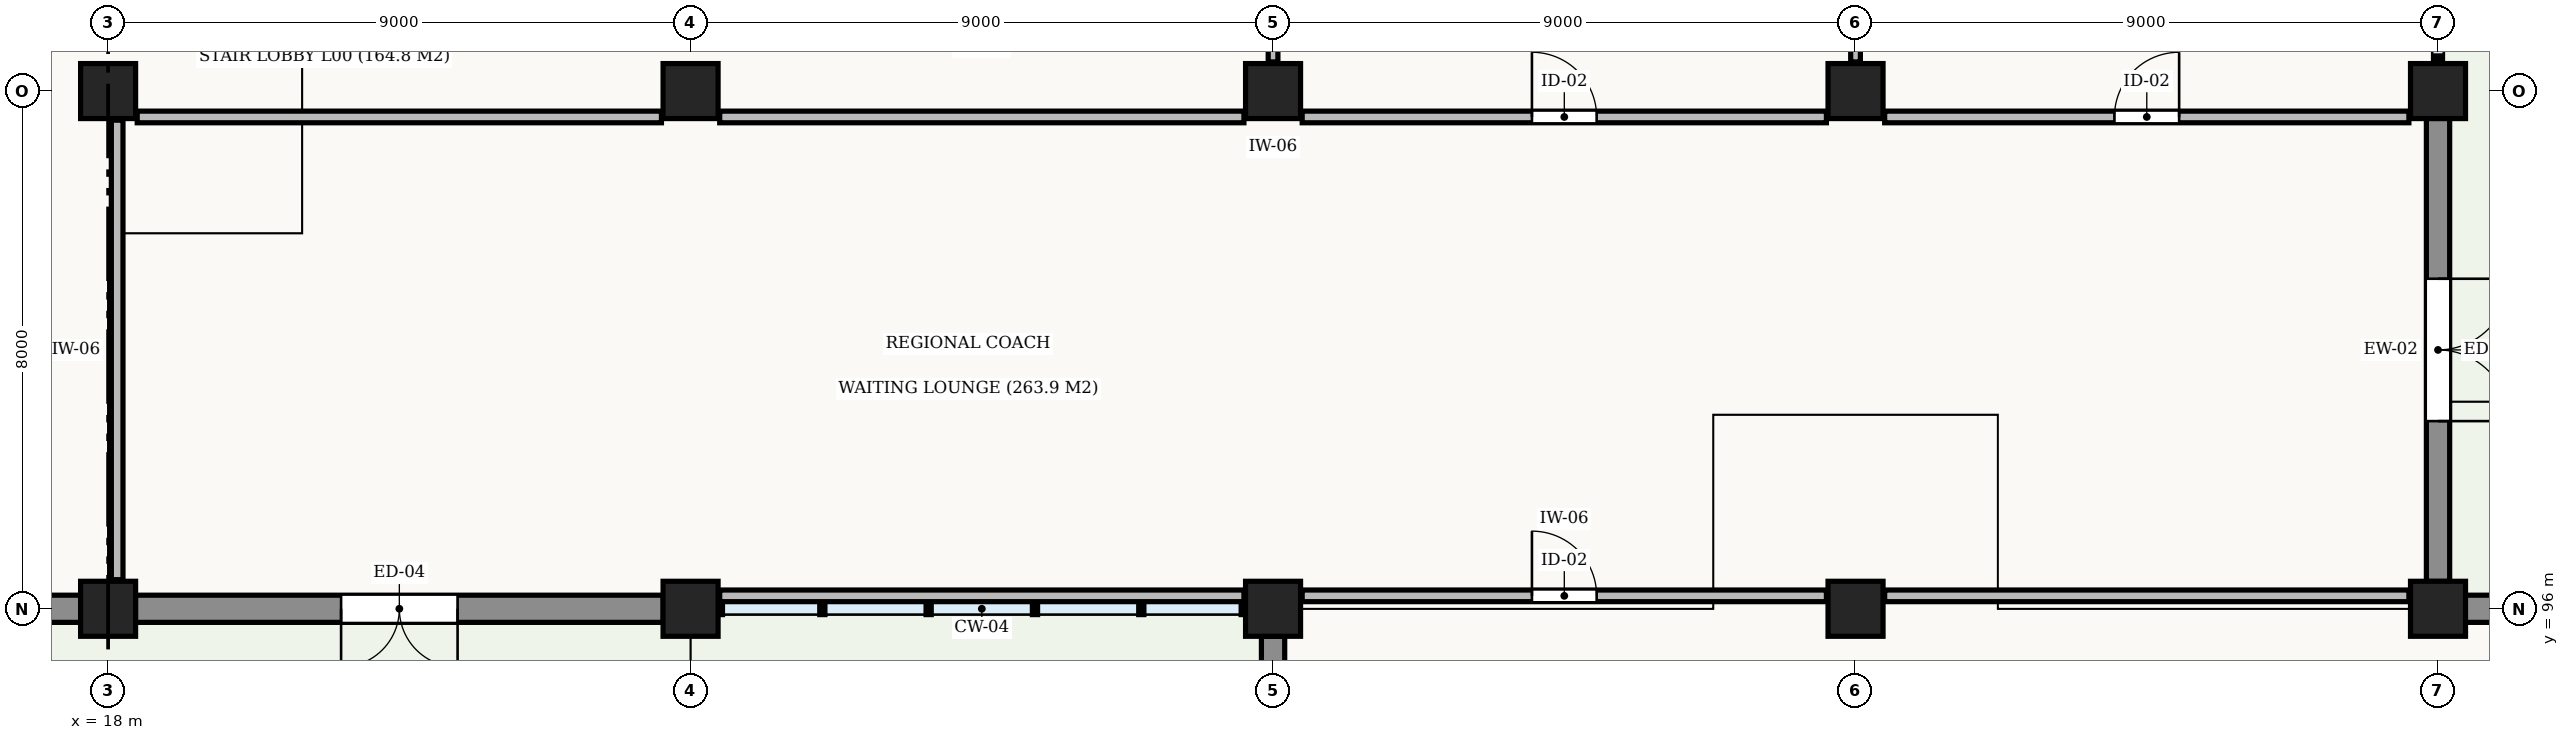
"""IFC4 building model, lengths in metres.
Left out: names, types, materials, properties, quantities, classifications, styles, units other than length and angle.
Written with IfcOpenShell. Run it as: python <this file> out.ifc"""

import sys

from ifc_helpers import new_model, si_unit, direction, frame, frame_2d, origin, origin_2d, place, context, subcontext, project, spatial, rectangle, extrude, element, fill, save


model = new_model("IFC4")
c1 = context("Model", 3, precision=1e-05, world=origin(), true_north=direction((0.0, 1.0)))
c2 = subcontext(c1, "Body", "Model", "MODEL_VIEW")
j1 = project(units=[si_unit("LENGTHUNIT", "METRE"), si_unit("PLANEANGLEUNIT", "RADIAN")], contexts=[c1])
p1 = place(None, origin())
s1 = spatial("IfcSite", under=j1, at=p1, CompositionType="ELEMENT")
p2 = place(p1, origin())
s2 = spatial("IfcBuilding", under=s1, at=p2, CompositionType="ELEMENT")
p3 = place(p2, origin())
s3 = spatial("IfcBuildingStorey", under=s2, at=p3, CompositionType="ELEMENT", Elevation=0.0)
for number, where, z_axis, x_axis in (
    (1, (18.0, 96.0, -0.42), (0.0, 0.0, 1.0), (1.0, 0.0, 0.0)),
    (2, (18.0, 104.0, -0.42), (0.0, 0.0, 1.0), (1.0, 0.0, 0.0)),
    (3, (27.0, 96.0, -0.42), (0.0, 0.0, 1.0), (1.0, 0.0, 0.0)),
    (4, (27.0, 104.0, -0.42), (0.0, 0.0, 1.0), (1.0, 0.0, 0.0)),
    (5, (36.0, 96.0, -0.42), (0.0, 0.0, 1.0), (1.0, 0.0, 0.0)),
    (6, (36.0, 104.0, -0.42), (0.0, 0.0, 1.0), (1.0, 0.0, 0.0)),
    (7, (45.0, 96.0, -0.42), (0.0, 0.0, 1.0), (1.0, 0.0, 0.0)),
    (8, (45.0, 104.0, -0.42), (0.0, 0.0, 1.0), (1.0, 0.0, 0.0)),
    (9, (54.0, 96.0, -0.42), (0.0, 0.0, 1.0), (1.0, 0.0, 0.0)),
    (10, (54.0, 104.0, -0.42), (0.0, 0.0, 1.0), (1.0, 0.0, 0.0)),
):
    element("IfcColumn", number, at=place(p3, frame(where, z_axis=z_axis, x_axis=x_axis)), inside=s3, PredefinedType="COLUMN", context=c2, shape_type="SweptSolid", body=[
        extrude(rectangle(XDim=0.85, YDim=0.85, at=origin_2d()), origin(), (0.0, 0.0, 1.0), 5.82),
    ])
p4 = place(p3, frame((36.0, 88.423, 0.0), z_axis=(0.0, 0.0, 1.0), x_axis=(0.0, 1.0, 0.0)))
e11 = element("IfcWall", 11, at=p4, inside=s3, PredefinedType="STANDARD", context=c2, shape_type="SweptSolid", body=[
    extrude(rectangle(XDim=7.154, YDim=0.36, at=frame_2d((3.577, 0.0))), origin(), (0.0, 0.0, 1.0), 4.38),
])
p5 = place(p4, frame((0.785, 0.0, 0.9)))
e12 = element("IfcOpeningElement", 12, at=p5, cuts=e11, PredefinedType="OPENING", context=c2, shape_type="SweptSolid", body=[
    extrude(rectangle(XDim=2.4, YDim=3.2, at=frame_2d((1.2, 1.6))), frame((0.0, 0.192, 0.0), z_axis=(0.0, -1.0, 0.0), x_axis=(1.0, 0.0, 0.0)), (0.0, 0.0, 1.0), 0.384),
])
p6 = place(p4, frame((3.969, 0.0, 0.9)))
e13 = element("IfcOpeningElement", 13, at=p6, cuts=e11, PredefinedType="OPENING", context=c2, shape_type="SweptSolid", body=[
    extrude(rectangle(XDim=2.4, YDim=3.2, at=frame_2d((1.2, 1.6))), frame((0.0, 0.192, 0.0), z_axis=(0.0, -1.0, 0.0), x_axis=(1.0, 0.0, 0.0)), (0.0, 0.0, 1.0), 0.384),
])
p7 = place(p3, frame((26.577, 96.0, 0.0), z_axis=(0.0, 0.0, 1.0), x_axis=(-1.0, 0.0, 0.0)))
e14 = element("IfcWall", 14, at=p7, inside=s3, PredefinedType="STANDARD", context=c2, shape_type="SweptSolid", body=[
    extrude(rectangle(XDim=8.154, YDim=0.42, at=frame_2d((4.077, 0.0))), origin(), (0.0, 0.0, 1.0), 4.38),
])
p8 = place(p7, frame((3.177, 0.0, 0.0)))
e15 = element("IfcOpeningElement", 15, at=p8, cuts=e14, PredefinedType="OPENING", context=c2, shape_type="SweptSolid", body=[
    extrude(rectangle(XDim=1.8, YDim=2.4, at=frame_2d((0.9, 1.2))), frame((0.0, 0.222, 0.0), z_axis=(0.0, -1.0, 0.0), x_axis=(1.0, 0.0, 0.0)), (0.0, 0.0, 1.0), 0.444),
])
p9 = place(p3, frame((17.577, 96.0, 0.0), z_axis=(0.0, 0.0, 1.0), x_axis=(-1.0, 0.0, 0.0)))
e16 = element("IfcWall", 16, at=p9, inside=s3, PredefinedType="STANDARD", context=c2, shape_type="SweptSolid", body=[
    extrude(rectangle(XDim=8.154, YDim=0.42, at=frame_2d((4.077, 0.0))), origin(), (0.0, 0.0, 1.0), 4.38),
])
p10 = place(p9, frame((2.877, 0.0, 0.0)))
e17 = element("IfcOpeningElement", 17, at=p10, cuts=e16, PredefinedType="OPENING", context=c2, shape_type="SweptSolid", body=[
    extrude(rectangle(XDim=2.4, YDim=2.7, at=frame_2d((1.2, 1.35))), frame((0.0, 0.222, 0.0), z_axis=(0.0, -1.0, 0.0), x_axis=(1.0, 0.0, 0.0)), (0.0, 0.0, 1.0), 0.444),
])
p11 = place(p3, frame((54.0, 103.577, 0.0), z_axis=(0.0, 0.0, 1.0), x_axis=(0.0, -1.0, 0.0)))
e18 = element("IfcWall", 18, at=p11, inside=s3, PredefinedType="STANDARD", context=c2, shape_type="SweptSolid", body=[
    extrude(rectangle(XDim=7.154, YDim=0.36, at=frame_2d((3.577, 0.0))), origin(), (0.0, 0.0, 1.0), 4.38),
])
p12 = place(p11, frame((2.477, 0.0, 0.0)))
e19 = element("IfcOpeningElement", 19, at=p12, cuts=e18, PredefinedType="OPENING", context=c2, shape_type="SweptSolid", body=[
    extrude(rectangle(XDim=2.2, YDim=2.6, at=frame_2d((1.1, 1.3))), frame((0.0, 0.192, 0.0), z_axis=(0.0, -1.0, 0.0), x_axis=(1.0, 0.0, 0.0)), (0.0, 0.0, 1.0), 0.384),
])
p13 = place(p3, frame((54.423, 96.0, 0.0), z_axis=(0.0, 0.0, 1.0), x_axis=(1.0, 0.0, 0.0)))
e20 = element("IfcWall", 20, at=p13, inside=s3, PredefinedType="STANDARD", context=c2, shape_type="SweptSolid", body=[
    extrude(rectangle(XDim=8.154, YDim=0.42, at=frame_2d((4.077, 0.0))), origin(), (0.0, 0.0, 1.0), 4.38),
])
p14 = place(p13, frame((2.877, 0.0, 0.0)))
e21 = element("IfcOpeningElement", 21, at=p14, cuts=e20, PredefinedType="OPENING", context=c2, shape_type="SweptSolid", body=[
    extrude(rectangle(XDim=2.4, YDim=2.7, at=frame_2d((1.2, 1.35))), frame((0.0, 0.222, 0.0), z_axis=(0.0, -1.0, 0.0), x_axis=(1.0, 0.0, 0.0)), (0.0, 0.0, 1.0), 0.444),
])
p15 = place(p3, frame((27.45, 96.2, 0.0), z_axis=(0.0, 0.0, 1.0), x_axis=(1.0, 0.0, 0.0)))
e22 = element("IfcWall", 22, at=p15, inside=s3, PredefinedType="STANDARD", context=c2, shape_type="SweptSolid", body=[
    extrude(rectangle(XDim=8.1, YDim=0.18, at=frame_2d((4.05, 0.0))), origin(), (0.0, 0.0, 1.0), 4.38),
])
p16 = place(p3, frame((36.45, 96.2, 0.0), z_axis=(0.0, 0.0, 1.0), x_axis=(1.0, 0.0, 0.0)))
e23 = element("IfcWall", 23, at=p16, inside=s3, PredefinedType="STANDARD", context=c2, shape_type="SweptSolid", body=[
    extrude(rectangle(XDim=8.1, YDim=0.18, at=frame_2d((4.05, 0.0))), origin(), (0.0, 0.0, 1.0), 4.23),
])
p17 = place(p16, frame((3.55, 0.0, 0.0)))
e24 = element("IfcOpeningElement", 24, at=p17, cuts=e23, PredefinedType="OPENING", context=c2, shape_type="SweptSolid", body=[
    extrude(rectangle(XDim=1.0, YDim=2.1, at=frame_2d((0.5, 1.05))), frame((0.0, 0.102, 0.0), z_axis=(0.0, -1.0, 0.0), x_axis=(1.0, 0.0, 0.0)), (0.0, 0.0, 1.0), 0.204),
])
p18 = place(p3, frame((45.45, 96.2, 0.0), z_axis=(0.0, 0.0, 1.0), x_axis=(1.0, 0.0, 0.0)))
e25 = element("IfcWall", 25, at=p18, inside=s3, PredefinedType="STANDARD", context=c2, shape_type="SweptSolid", body=[
    extrude(rectangle(XDim=8.1, YDim=0.18, at=frame_2d((4.05, 0.0))), origin(), (0.0, 0.0, 1.0), 4.23),
])
for number, where, z_axis, x_axis in (
    (26, (18.45, 103.6, 0.0), (0.0, 0.0, 1.0), (1.0, 0.0, 0.0)),
    (27, (27.45, 103.6, 0.0), (0.0, 0.0, 1.0), (1.0, 0.0, 0.0)),
):
    element("IfcWall", number, at=place(p3, frame(where, z_axis=z_axis, x_axis=x_axis)), inside=s3, PredefinedType="STANDARD", context=c2, shape_type="SweptSolid", body=[
        extrude(rectangle(XDim=8.1, YDim=0.18, at=frame_2d((4.05, 0.0))), origin(), (0.0, 0.0, 1.0), 5.05),
    ])
p19 = place(p3, frame((36.45, 103.6, 0.0), z_axis=(0.0, 0.0, 1.0), x_axis=(1.0, 0.0, 0.0)))
e28 = element("IfcWall", 28, at=p19, inside=s3, PredefinedType="STANDARD", context=c2, shape_type="SweptSolid", body=[
    extrude(rectangle(XDim=8.1, YDim=0.18, at=frame_2d((4.05, 0.0))), origin(), (0.0, 0.0, 1.0), 5.05),
])
p20 = place(p19, frame((3.55, 0.0, 0.0)))
e29 = element("IfcOpeningElement", 29, at=p20, cuts=e28, PredefinedType="OPENING", context=c2, shape_type="SweptSolid", body=[
    extrude(rectangle(XDim=1.0, YDim=2.1, at=frame_2d((0.5, 1.05))), frame((0.0, 0.102, 0.0), z_axis=(0.0, -1.0, 0.0), x_axis=(1.0, 0.0, 0.0)), (0.0, 0.0, 1.0), 0.204),
])
p21 = place(p3, frame((45.45, 103.6, 0.0), z_axis=(0.0, 0.0, 1.0), x_axis=(1.0, 0.0, 0.0)))
e30 = element("IfcWall", 30, at=p21, inside=s3, PredefinedType="STANDARD", context=c2, shape_type="SweptSolid", body=[
    extrude(rectangle(XDim=8.1, YDim=0.18, at=frame_2d((4.05, 0.0))), origin(), (0.0, 0.0, 1.0), 5.05),
])
p22 = place(p21, frame((3.55, 0.0, 0.0)))
e31 = element("IfcOpeningElement", 31, at=p22, cuts=e30, PredefinedType="OPENING", context=c2, shape_type="SweptSolid", body=[
    extrude(rectangle(XDim=1.0, YDim=2.1, at=frame_2d((0.5, 1.05))), frame((0.0, 0.102, 0.0), z_axis=(0.0, -1.0, 0.0), x_axis=(1.0, 0.0, 0.0)), (0.0, 0.0, 1.0), 0.204),
])
p23 = place(p3, frame((18.14, 96.45, 0.0), z_axis=(0.0, 0.0, 1.0), x_axis=(0.0, 1.0, 0.0)))
e32 = element("IfcWall", 32, at=p23, inside=s3, PredefinedType="STANDARD", context=c2, shape_type="SweptSolid", body=[
    extrude(rectangle(XDim=7.1, YDim=0.18, at=frame_2d((3.55, 0.0))), origin(), (0.0, 0.0, 1.0), 4.23),
])
p24 = place(p3, frame((36.0, 104.45, 0.0), z_axis=(0.0, 0.0, 1.0), x_axis=(0.0, 1.0, 0.0)))
e33 = element("IfcWall", 33, at=p24, inside=s3, PredefinedType="STANDARD", context=c2, shape_type="SweptSolid", body=[
    extrude(rectangle(XDim=1.425, YDim=0.15, at=frame_2d((0.712, 0.0))), origin(), (0.0, 0.0, 1.0), 4.33),
])
p25 = place(p3, frame((45.0, 104.45, 0.0), z_axis=(0.0, 0.0, 1.0), x_axis=(0.0, 1.0, 0.0)))
e34 = element("IfcWall", 34, at=p25, inside=s3, PredefinedType="STANDARD", context=c2, shape_type="SweptSolid", body=[
    extrude(rectangle(XDim=7.025, YDim=0.15, at=frame_2d((3.513, 0.0))), origin(), (0.0, 0.0, 1.0), 4.33),
])
p26 = place(p8, origin())
e35 = element("IfcDoor", 35, at=p26, inside=s3, OperationType="SINGLE_SWING_LEFT", PredefinedType="DOOR", context=c2, shape_type="SweptSolid", body=[
    extrude(rectangle(XDim=1.8, YDim=2.4, at=frame_2d((0.9, 1.2))), frame((0.0, 0.025, 0.0), z_axis=(0.0, -1.0, 0.0), x_axis=(1.0, 0.0, 0.0)), (0.0, 0.0, 1.0), 0.05),
])
fill(e15, e35)
p27 = place(p12, origin())
e36 = element("IfcDoor", 36, at=p27, inside=s3, OperationType="SINGLE_SWING_LEFT", PredefinedType="DOOR", context=c2, shape_type="SweptSolid", body=[
    extrude(rectangle(XDim=2.2, YDim=2.6, at=frame_2d((1.1, 1.3))), frame((0.0, 0.025, 0.0), z_axis=(0.0, -1.0, 0.0), x_axis=(1.0, 0.0, 0.0)), (0.0, 0.0, 1.0), 0.05),
])
fill(e19, e36)
p28 = place(p17, origin())
e37 = element("IfcDoor", 37, at=p28, inside=s3, OperationType="SINGLE_SWING_LEFT", PredefinedType="DOOR", context=c2, shape_type="SweptSolid", body=[
    extrude(rectangle(XDim=1.0, YDim=2.1, at=frame_2d((0.5, 1.05))), frame((0.0, 0.025, 0.0), z_axis=(0.0, -1.0, 0.0), x_axis=(1.0, 0.0, 0.0)), (0.0, 0.0, 1.0), 0.05),
])
fill(e24, e37)
p29 = place(p20, origin())
e38 = element("IfcDoor", 38, at=p29, inside=s3, OperationType="SINGLE_SWING_LEFT", PredefinedType="DOOR", context=c2, shape_type="SweptSolid", body=[
    extrude(rectangle(XDim=1.0, YDim=2.1, at=frame_2d((0.5, 1.05))), frame((0.0, 0.025, 0.0), z_axis=(0.0, -1.0, 0.0), x_axis=(1.0, 0.0, 0.0)), (0.0, 0.0, 1.0), 0.05),
])
fill(e29, e38)
p30 = place(p22, origin())
e39 = element("IfcDoor", 39, at=p30, inside=s3, OperationType="SINGLE_SWING_RIGHT", PredefinedType="DOOR", context=c2, shape_type="SweptSolid", body=[
    extrude(rectangle(XDim=1.0, YDim=2.1, at=frame_2d((0.5, 1.05))), frame((0.0, 0.025, 0.0), z_axis=(0.0, -1.0, 0.0), x_axis=(1.0, 0.0, 0.0)), (0.0, 0.0, 1.0), 0.05),
])
fill(e31, e39)
save(model, sys.argv[1])
